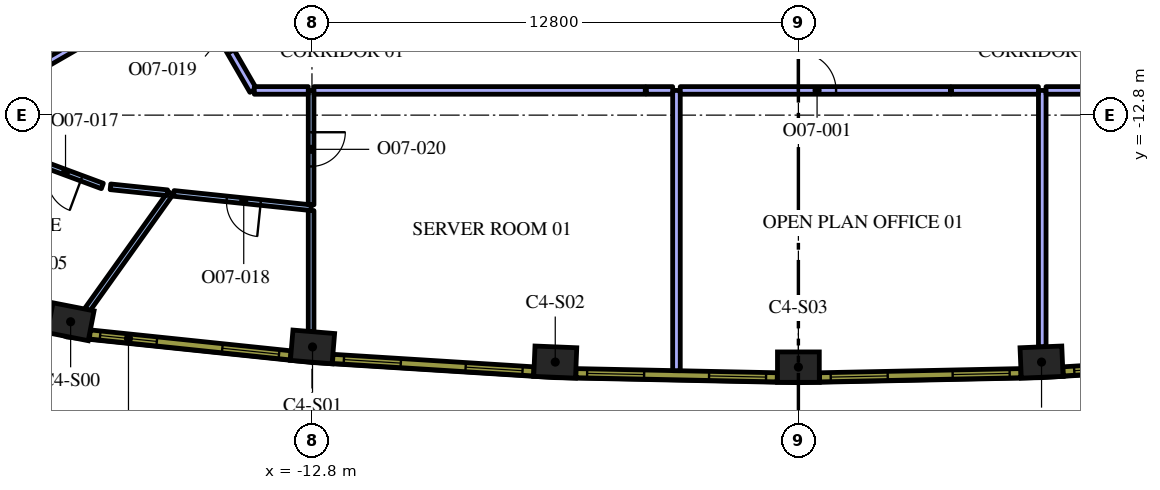
"""IFC4 building model, lengths in metres.
Left out: names, types, materials, properties, quantities, classifications, styles, units other than length and angle.
Written with IfcOpenShell. Run it as: python <this file> out.ifc"""

import sys

from ifc_helpers import new_model, si_unit, direction, frame, frame_2d, origin, origin_2d, place, context, subcontext, project, spatial, rectangle, extrude, element, fill, save


model = new_model("IFC4")
c1 = context("Model", 3, precision=1e-05, world=origin(), true_north=direction((0.0, 1.0)))
c2 = subcontext(c1, "Body", "Model", "MODEL_VIEW")
j1 = project(units=[si_unit("LENGTHUNIT", "METRE"), si_unit("PLANEANGLEUNIT", "RADIAN")], contexts=[c1])
p1 = place(None, origin())
s1 = spatial("IfcSite", under=j1, at=p1, CompositionType="ELEMENT")
p2 = place(p1, origin())
s2 = spatial("IfcBuilding", under=s1, at=p2, CompositionType="ELEMENT")
p3 = place(p2, frame((0.0, 0.0, 218.4)))
s3 = spatial("IfcBuildingStorey", under=s2, at=p3, CompositionType="ELEMENT", Elevation=218.4)
for number, where, z_axis, x_axis in (
    (1, (-19.15, -18.237, 0.0), (0.0, 0.0, 1.0), (0.981, -0.192, 0.0)),
    (2, (-12.785, -18.9, 0.0), (0.0, 0.0, 1.0), (0.997, -0.083, 0.0)),
    (3, (-6.398, -19.298, 0.0), (0.0, 0.0, 1.0), (0.999, -0.041, 0.0)),
    (4, (0.0, -19.431, 0.0), (0.0, 0.0, 1.0), (1.0, 0.0, 0.0)),
    (5, (6.398, -19.298, 0.0), (0.0, 0.0, 1.0), (0.999, 0.041, 0.0)),
):
    element("IfcColumn", number, at=place(p3, frame(where, z_axis=z_axis, x_axis=x_axis)), inside=s3, PredefinedType="COLUMN", context=c2, shape_type="SweptSolid", body=[
        extrude(rectangle(XDim=1.1, YDim=0.8, at=origin_2d()), origin(), (0.0, 0.0, 1.0), 4.2),
    ])
p4 = place(p3, frame((6.417, -12.15, 0.0), z_axis=(0.0, 0.0, 1.0), x_axis=(0.0, -1.0, 0.0)))
e6 = element("IfcWall", 6, at=p4, inside=s3, PredefinedType="PARTITIONING", context=c2, shape_type="SweptSolid", body=[
    extrude(rectangle(XDim=6.747, YDim=0.2, at=frame_2d((3.374, 0.0))), origin(), (0.0, 0.0, 1.0), 3.45),
])
p5 = place(p3, frame((-3.208, -19.524, 0.0), z_axis=(0.0, 0.0, 1.0), x_axis=(0.0, 1.0, 0.0)))
e7 = element("IfcWall", 7, at=p5, inside=s3, PredefinedType="PARTITIONING", context=c2, shape_type="SweptSolid", body=[
    extrude(rectangle(XDim=7.374, YDim=0.2, at=frame_2d((3.687, 0.0))), origin(), (0.0, 0.0, 1.0), 3.45),
])
p6 = place(p3, frame((-3.108, -12.15, 0.0), z_axis=(0.0, 0.0, 1.0), x_axis=(1.0, 0.0, 0.0)))
e8 = element("IfcWall", 8, at=p6, inside=s3, PredefinedType="PARTITIONING", context=c2, shape_type="SweptSolid", body=[
    extrude(rectangle(XDim=7.108, YDim=0.2, at=frame_2d((3.554, 0.0))), origin(), (0.0, 0.0, 1.0), 3.45),
])
p7 = place(p6, frame((3.1, 0.0, 0.0)))
e9 = element("IfcOpeningElement", 9, at=p7, cuts=e8, PredefinedType="OPENING", context=c2, shape_type="SweptSolid", body=[
    extrude(rectangle(XDim=1.0, YDim=2.1, at=frame_2d((0.5, 1.05))), frame((0.0, 0.11, 0.0), z_axis=(0.0, -1.0, 0.0), x_axis=(1.0, 0.0, 0.0)), (0.0, 0.0, 1.0), 0.22),
])
p8 = place(p3, frame((4.03, -12.15, 0.0), z_axis=(0.0, 0.0, 1.0), x_axis=(1.0, 0.0, 0.0)))
e10 = element("IfcWall", 10, at=p8, inside=s3, PredefinedType="PARTITIONING", context=c2, shape_type="SweptSolid", body=[
    extrude(rectangle(XDim=2.287, YDim=0.2, at=frame_2d((1.144, 0.0))), origin(), (0.0, 0.0, 1.0), 3.45),
])
p9 = place(p3, frame((6.517, -12.15, 0.0), z_axis=(0.0, 0.0, 1.0), x_axis=(1.0, 0.0, 0.0)))
e11 = element("IfcWall", 11, at=p9, inside=s3, PredefinedType="PARTITIONING", context=c2, shape_type="SweptSolid", body=[
    extrude(rectangle(XDim=7.83, YDim=0.2, at=frame_2d((3.915, 0.0))), origin(), (0.0, 0.0, 1.0), 3.45),
])
p10 = place(p9, frame((3.4, 0.0, 0.0)))
e12 = element("IfcOpeningElement", 12, at=p10, cuts=e11, PredefinedType="OPENING", context=c2, shape_type="SweptSolid", body=[
    extrude(rectangle(XDim=1.0, YDim=2.1, at=frame_2d((0.5, 1.05))), frame((0.0, 0.11, 0.0), z_axis=(0.0, -1.0, 0.0), x_axis=(1.0, 0.0, 0.0)), (0.0, 0.0, 1.0), 0.22),
])
p11 = place(p3, frame((-16.021, -9.25, 0.0), z_axis=(0.0, 0.0, 1.0), x_axis=(-0.866021955858, -0.500005971936, 0.0)))
e13 = element("IfcWall", 13, at=p11, inside=s3, PredefinedType="PARTITIONING", context=c2, shape_type="SweptSolid", body=[
    extrude(rectangle(XDim=6.56, YDim=0.2, at=frame_2d((3.28, 0.0))), origin(), (0.0, 0.0, 1.0), 3.45),
])
p12 = place(p3, frame((-16.521, -14.851, 0.0), z_axis=(0.0, 0.0, 1.0), x_axis=(-0.58104805465, -0.813869251285, 0.0)))
e14 = element("IfcWall", 14, at=p12, inside=s3, PredefinedType="PARTITIONING", context=c2, shape_type="SweptSolid", body=[
    extrude(rectangle(XDim=3.766, YDim=0.15, at=frame_2d((1.883, 0.0))), origin(), (0.0, 0.0, 1.0), 3.45),
])
p13 = place(p3, frame((-18.316, -14.664, 0.0), z_axis=(0.0, 0.0, 1.0), x_axis=(-0.937594570401, 0.347730386297, 0.0)))
e15 = element("IfcWall", 15, at=p13, inside=s3, PredefinedType="PARTITIONING", context=c2, shape_type="SweptSolid", body=[
    extrude(rectangle(XDim=2.083, YDim=0.15, at=frame_2d((1.042, 0.0))), origin(), (0.0, 0.0, 1.0), 3.45),
])
p14 = place(p13, frame((0.583, 0.0, 0.0)))
e16 = element("IfcOpeningElement", 16, at=p14, cuts=e15, PredefinedType="OPENING", context=c2, shape_type="SweptSolid", body=[
    extrude(rectangle(XDim=0.9, YDim=2.1, at=frame_2d((0.45, 1.05))), frame((0.0, 0.085, 0.0), z_axis=(0.0, -1.0, 0.0), x_axis=(1.0, 0.0, 0.0)), (0.0, 0.0, 1.0), 0.17),
])
p15 = place(p3, frame((-18.103, -14.686, 0.0), z_axis=(0.0, 0.0, 1.0), x_axis=(0.994622241781, -0.103569281909, 0.0)))
e17 = element("IfcWall", 17, at=p15, inside=s3, PredefinedType="PARTITIONING", context=c2, shape_type="SweptSolid", body=[
    extrude(rectangle(XDim=1.504, YDim=0.15, at=frame_2d((0.752, 0.0))), origin(), (0.0, 0.0, 1.0), 3.45),
])
p16 = place(p3, frame((-12.823, -15.236, 0.0), z_axis=(0.0, 0.0, 1.0), x_axis=(-0.994621582944, 0.10357560882, 0.0)))
e18 = element("IfcWall", 18, at=p16, inside=s3, PredefinedType="PARTITIONING", context=c2, shape_type="SweptSolid", body=[
    extrude(rectangle(XDim=3.632, YDim=0.15, at=frame_2d((1.816, 0.0))), origin(), (0.0, 0.0, 1.0), 3.45),
])
p17 = place(p16, frame((1.332, 0.0, 0.0)))
e19 = element("IfcOpeningElement", 19, at=p17, cuts=e18, PredefinedType="OPENING", context=c2, shape_type="SweptSolid", body=[
    extrude(rectangle(XDim=0.9, YDim=2.1, at=frame_2d((0.45, 1.05))), frame((0.0, 0.085, 0.0), z_axis=(0.0, -1.0, 0.0), x_axis=(1.0, 0.0, 0.0)), (0.0, 0.0, 1.0), 0.17),
])
p18 = place(p3, frame((-12.823, -15.312, 0.0), z_axis=(0.0, 0.0, 1.0), x_axis=(0.0, -1.0, 0.0)))
e20 = element("IfcWall", 20, at=p18, inside=s3, PredefinedType="PARTITIONING", context=c2, shape_type="SweptSolid", body=[
    extrude(rectangle(XDim=3.184, YDim=0.15, at=frame_2d((1.592, 0.0))), origin(), (0.0, 0.0, 1.0), 3.45),
])
p19 = place(p3, frame((-12.823, -12.15, 0.0), z_axis=(0.0, 0.0, 1.0), x_axis=(0.0, -1.0, 0.0)))
e21 = element("IfcWall", 21, at=p19, inside=s3, PredefinedType="PARTITIONING", context=c2, shape_type="SweptSolid", body=[
    extrude(rectangle(XDim=3.011, YDim=0.15, at=frame_2d((1.505, 0.0))), origin(), (0.0, 0.0, 1.0), 3.45),
])
p20 = place(p19, frame((1.1, 0.0, 0.0)))
e22 = element("IfcOpeningElement", 22, at=p20, cuts=e21, PredefinedType="OPENING", context=c2, shape_type="SweptSolid", body=[
    extrude(rectangle(XDim=0.9, YDim=2.1, at=frame_2d((0.45, 1.05))), frame((0.0, 0.085, 0.0), z_axis=(0.0, -1.0, 0.0), x_axis=(1.0, 0.0, 0.0)), (0.0, 0.0, 1.0), 0.17),
])
p21 = place(p3, frame((-15.971, -9.337, 0.0), z_axis=(0.0, 0.0, 1.0), x_axis=(0.500010870188, -0.866019127788, 0.0)))
e23 = element("IfcWall", 23, at=p21, inside=s3, PredefinedType="PARTITIONING", context=c2, shape_type="SweptSolid", body=[
    extrude(rectangle(XDim=3.249, YDim=0.2, at=frame_2d((1.624, 0.0))), origin(), (0.0, 0.0, 1.0), 3.45),
])
p22 = place(p21, frame((1.1, 0.0, 0.0)))
e24 = element("IfcOpeningElement", 24, at=p22, cuts=e23, PredefinedType="OPENING", context=c2, shape_type="SweptSolid", body=[
    extrude(rectangle(XDim=1.0, YDim=2.1, at=frame_2d((0.5, 1.05))), frame((0.0, 0.11, 0.0), z_axis=(0.0, -1.0, 0.0), x_axis=(1.0, 0.0, 0.0)), (0.0, 0.0, 1.0), 0.22),
])
p23 = place(p3, frame((-14.317, -12.15, 0.0), z_axis=(0.0, 0.0, 1.0), x_axis=(1.0, 0.0, 0.0)))
e25 = element("IfcWall", 25, at=p23, inside=s3, PredefinedType="PARTITIONING", context=c2, shape_type="SweptSolid", body=[
    extrude(rectangle(XDim=1.419, YDim=0.2, at=frame_2d((0.71, 0.0))), origin(), (0.0, 0.0, 1.0), 3.45),
])
p24 = place(p3, frame((-4.0, -12.15, 0.0), z_axis=(0.0, 0.0, 1.0), x_axis=(1.0, 0.0, 0.0)))
e26 = element("IfcWall", 26, at=p24, inside=s3, PredefinedType="PARTITIONING", context=c2, shape_type="SweptSolid", body=[
    extrude(rectangle(XDim=0.692, YDim=0.2, at=frame_2d((0.346, 0.0))), origin(), (0.0, 0.0, 1.0), 3.45),
])
p25 = place(p3, frame((-12.748, -12.15, 0.0), z_axis=(0.0, 0.0, 1.0), x_axis=(1.0, 0.0, 0.0)))
e27 = element("IfcWall", 27, at=p25, inside=s3, PredefinedType="PARTITIONING", context=c2, shape_type="SweptSolid", body=[
    extrude(rectangle(XDim=8.718, YDim=0.2, at=frame_2d((4.359, 0.0))), origin(), (0.0, 0.0, 1.0), 3.45),
])
p26 = place(p3, frame((-18.644, -18.571, 0.0), z_axis=(0.0, 0.0, 1.0), x_axis=(0.994621961215, -0.103571976272, 0.0)))
e28 = element("IfcWall", 28, at=p26, inside=s3, PredefinedType="SOLIDWALL", context=c2, shape_type="SweptSolid", body=[
    extrude(rectangle(XDim=5.311, YDim=0.24, at=frame_2d((2.655, 0.0))), origin(), (0.0, 0.0, 1.0), 3.95),
])
p27 = place(p26, frame((0.271, 0.0, 0.9)))
e29 = element("IfcOpeningElement", 29, at=p27, cuts=e28, PredefinedType="OPENING", context=c2, shape_type="SweptSolid", body=[
    extrude(rectangle(XDim=1.5, YDim=2.55, at=frame_2d((0.75, 1.275))), frame((0.0, 0.13, 0.0), z_axis=(0.0, -1.0, 0.0), x_axis=(1.0, 0.0, 0.0)), (0.0, 0.0, 1.0), 0.26),
])
p28 = place(p26, frame((3.504, 0.0, 0.9)))
e30 = element("IfcOpeningElement", 30, at=p28, cuts=e28, PredefinedType="OPENING", context=c2, shape_type="SweptSolid", body=[
    extrude(rectangle(XDim=1.5, YDim=2.55, at=frame_2d((0.75, 1.275))), frame((0.0, 0.13, 0.0), z_axis=(0.0, -1.0, 0.0), x_axis=(1.0, 0.0, 0.0)), (0.0, 0.0, 1.0), 0.26),
])
p29 = place(p3, frame((-12.253, -19.213, 0.0), z_axis=(0.0, 0.0, 1.0), x_axis=(0.9980633213, -0.062206162685, 0.0)))
e31 = element("IfcWall", 31, at=p29, inside=s3, PredefinedType="SOLIDWALL", context=c2, shape_type="SweptSolid", body=[
    extrude(rectangle(XDim=5.298, YDim=0.24, at=frame_2d((2.649, 0.0))), origin(), (0.0, 0.0, 1.0), 3.95),
])
p30 = place(p29, frame((0.294, 0.0, 0.9)))
e32 = element("IfcOpeningElement", 32, at=p30, cuts=e31, PredefinedType="OPENING", context=c2, shape_type="SweptSolid", body=[
    extrude(rectangle(XDim=1.5, YDim=2.55, at=frame_2d((0.75, 1.275))), frame((0.0, 0.13, 0.0), z_axis=(0.0, -1.0, 0.0), x_axis=(1.0, 0.0, 0.0)), (0.0, 0.0, 1.0), 0.26),
])
p31 = place(p29, frame((3.504, 0.0, 0.9)))
e33 = element("IfcOpeningElement", 33, at=p31, cuts=e31, PredefinedType="OPENING", context=c2, shape_type="SweptSolid", body=[
    extrude(rectangle(XDim=1.5, YDim=2.55, at=frame_2d((0.75, 1.275))), frame((0.0, 0.13, 0.0), z_axis=(0.0, -1.0, 0.0), x_axis=(1.0, 0.0, 0.0)), (0.0, 0.0, 1.0), 0.26),
])
p32 = place(p3, frame((-5.854, -19.589, 0.0), z_axis=(0.0, 0.0, 1.0), x_axis=(0.999784035184, -0.020781794712, 0.0)))
e34 = element("IfcWall", 34, at=p32, inside=s3, PredefinedType="SOLIDWALL", context=c2, shape_type="SweptSolid", body=[
    extrude(rectangle(XDim=5.298, YDim=0.24, at=frame_2d((2.649, 0.0))), origin(), (0.0, 0.0, 1.0), 3.95),
])
p33 = place(p32, frame((0.294, 0.0, 0.9)))
e35 = element("IfcOpeningElement", 35, at=p33, cuts=e34, PredefinedType="OPENING", context=c2, shape_type="SweptSolid", body=[
    extrude(rectangle(XDim=1.5, YDim=2.55, at=frame_2d((0.75, 1.275))), frame((0.0, 0.13, 0.0), z_axis=(0.0, -1.0, 0.0), x_axis=(1.0, 0.0, 0.0)), (0.0, 0.0, 1.0), 0.26),
])
p34 = place(p32, frame((3.504, 0.0, 0.9)))
e36 = element("IfcOpeningElement", 36, at=p34, cuts=e34, PredefinedType="OPENING", context=c2, shape_type="SweptSolid", body=[
    extrude(rectangle(XDim=1.5, YDim=2.55, at=frame_2d((0.75, 1.275))), frame((0.0, 0.13, 0.0), z_axis=(0.0, -1.0, 0.0), x_axis=(1.0, 0.0, 0.0)), (0.0, 0.0, 1.0), 0.26),
])
p35 = place(p3, frame((0.556, -19.699, 0.0), z_axis=(0.0, 0.0, 1.0), x_axis=(0.999784035184, 0.020781794712, 0.0)))
e37 = element("IfcWall", 37, at=p35, inside=s3, PredefinedType="SOLIDWALL", context=c2, shape_type="SweptSolid", body=[
    extrude(rectangle(XDim=5.298, YDim=0.24, at=frame_2d((2.649, 0.0))), origin(), (0.0, 0.0, 1.0), 3.95),
])
p36 = place(p35, frame((0.294, 0.0, 0.9)))
e38 = element("IfcOpeningElement", 38, at=p36, cuts=e37, PredefinedType="OPENING", context=c2, shape_type="SweptSolid", body=[
    extrude(rectangle(XDim=1.5, YDim=2.55, at=frame_2d((0.75, 1.275))), frame((0.0, 0.13, 0.0), z_axis=(0.0, -1.0, 0.0), x_axis=(1.0, 0.0, 0.0)), (0.0, 0.0, 1.0), 0.26),
])
p37 = place(p35, frame((3.504, 0.0, 0.9)))
e39 = element("IfcOpeningElement", 39, at=p37, cuts=e37, PredefinedType="OPENING", context=c2, shape_type="SweptSolid", body=[
    extrude(rectangle(XDim=1.5, YDim=2.55, at=frame_2d((0.75, 1.275))), frame((0.0, 0.13, 0.0), z_axis=(0.0, -1.0, 0.0), x_axis=(1.0, 0.0, 0.0)), (0.0, 0.0, 1.0), 0.26),
])
p38 = place(p3, frame((6.965, -19.543, 0.0), z_axis=(0.0, 0.0, 1.0), x_axis=(0.9980633213, 0.062206162685, 0.0)))
e40 = element("IfcWall", 40, at=p38, inside=s3, PredefinedType="SOLIDWALL", context=c2, shape_type="SweptSolid", body=[
    extrude(rectangle(XDim=5.298, YDim=0.24, at=frame_2d((2.649, 0.0))), origin(), (0.0, 0.0, 1.0), 3.95),
])
p39 = place(p38, frame((0.295, 0.0, 0.9)))
e41 = element("IfcOpeningElement", 41, at=p39, cuts=e40, PredefinedType="OPENING", context=c2, shape_type="SweptSolid", body=[
    extrude(rectangle(XDim=1.5, YDim=2.55, at=frame_2d((0.75, 1.275))), frame((0.0, 0.13, 0.0), z_axis=(0.0, -1.0, 0.0), x_axis=(1.0, 0.0, 0.0)), (0.0, 0.0, 1.0), 0.26),
])
p40 = place(p38, frame((3.504, 0.0, 0.9)))
e42 = element("IfcOpeningElement", 42, at=p40, cuts=e40, PredefinedType="OPENING", context=c2, shape_type="SweptSolid", body=[
    extrude(rectangle(XDim=1.5, YDim=2.55, at=frame_2d((0.75, 1.275))), frame((0.0, 0.13, 0.0), z_axis=(0.0, -1.0, 0.0), x_axis=(1.0, 0.0, 0.0)), (0.0, 0.0, 1.0), 0.26),
])
p41 = place(p7, origin())
e43 = element("IfcDoor", 43, at=p41, inside=s3, OperationType="SINGLE_SWING_RIGHT", PredefinedType="DOOR", context=c2, shape_type="SweptSolid", body=[
    extrude(rectangle(XDim=1.0, YDim=2.1, at=frame_2d((0.5, 1.05))), frame((0.0, 0.025, 0.0), z_axis=(0.0, -1.0, 0.0), x_axis=(1.0, 0.0, 0.0)), (0.0, 0.0, 1.0), 0.05),
])
fill(e9, e43)
p42 = place(p14, origin())
e44 = element("IfcDoor", 44, at=p42, inside=s3, OperationType="SINGLE_SWING_LEFT", PredefinedType="DOOR", context=c2, shape_type="SweptSolid", body=[
    extrude(rectangle(XDim=0.9, YDim=2.1, at=frame_2d((0.45, 1.05))), frame((0.0, 0.025, 0.0), z_axis=(0.0, -1.0, 0.0), x_axis=(1.0, 0.0, 0.0)), (0.0, 0.0, 1.0), 0.05),
])
fill(e16, e44)
p43 = place(p17, origin())
e45 = element("IfcDoor", 45, at=p43, inside=s3, OperationType="SINGLE_SWING_LEFT", PredefinedType="DOOR", context=c2, shape_type="SweptSolid", body=[
    extrude(rectangle(XDim=0.9, YDim=2.1, at=frame_2d((0.45, 1.05))), frame((0.0, 0.025, 0.0), z_axis=(0.0, -1.0, 0.0), x_axis=(1.0, 0.0, 0.0)), (0.0, 0.0, 1.0), 0.05),
])
fill(e19, e45)
p44 = place(p22, origin())
e46 = element("IfcDoor", 46, at=p44, inside=s3, OperationType="SINGLE_SWING_LEFT", PredefinedType="DOOR", context=c2, shape_type="SweptSolid", body=[
    extrude(rectangle(XDim=1.0, YDim=2.1, at=frame_2d((0.5, 1.05))), frame((0.0, 0.025, 0.0), z_axis=(0.0, -1.0, 0.0), x_axis=(1.0, 0.0, 0.0)), (0.0, 0.0, 1.0), 0.05),
])
fill(e24, e46)
p45 = place(p20, origin())
e47 = element("IfcDoor", 47, at=p45, inside=s3, OperationType="SINGLE_SWING_RIGHT", PredefinedType="DOOR", context=c2, shape_type="SweptSolid", body=[
    extrude(rectangle(XDim=0.9, YDim=2.1, at=frame_2d((0.45, 1.05))), frame((0.0, 0.025, 0.0), z_axis=(0.0, -1.0, 0.0), x_axis=(1.0, 0.0, 0.0)), (0.0, 0.0, 1.0), 0.05),
])
fill(e22, e47)
p46 = place(p27, origin())
e48 = element("IfcWindow", 48, at=p46, inside=s3, PartitioningType="SINGLE_PANEL", PredefinedType="WINDOW", context=c2, shape_type="SweptSolid", body=[
    extrude(rectangle(XDim=1.5, YDim=2.55, at=frame_2d((0.75, 1.275))), frame((0.0, 0.04, 0.0), z_axis=(0.0, -1.0, 0.0), x_axis=(1.0, 0.0, 0.0)), (0.0, 0.0, 1.0), 0.06),
])
fill(e29, e48)
p47 = place(p28, origin())
e49 = element("IfcWindow", 49, at=p47, inside=s3, PartitioningType="SINGLE_PANEL", PredefinedType="WINDOW", context=c2, shape_type="SweptSolid", body=[
    extrude(rectangle(XDim=1.5, YDim=2.55, at=frame_2d((0.75, 1.275))), frame((0.0, 0.04, 0.0), z_axis=(0.0, -1.0, 0.0), x_axis=(1.0, 0.0, 0.0)), (0.0, 0.0, 1.0), 0.06),
])
fill(e30, e49)
p48 = place(p30, origin())
e50 = element("IfcWindow", 50, at=p48, inside=s3, PartitioningType="SINGLE_PANEL", PredefinedType="WINDOW", context=c2, shape_type="SweptSolid", body=[
    extrude(rectangle(XDim=1.5, YDim=2.55, at=frame_2d((0.75, 1.275))), frame((0.0, 0.04, 0.0), z_axis=(0.0, -1.0, 0.0), x_axis=(1.0, 0.0, 0.0)), (0.0, 0.0, 1.0), 0.06),
])
fill(e32, e50)
p49 = place(p31, origin())
e51 = element("IfcWindow", 51, at=p49, inside=s3, PartitioningType="SINGLE_PANEL", PredefinedType="WINDOW", context=c2, shape_type="SweptSolid", body=[
    extrude(rectangle(XDim=1.5, YDim=2.55, at=frame_2d((0.75, 1.275))), frame((0.0, 0.04, 0.0), z_axis=(0.0, -1.0, 0.0), x_axis=(1.0, 0.0, 0.0)), (0.0, 0.0, 1.0), 0.06),
])
fill(e33, e51)
p50 = place(p33, origin())
e52 = element("IfcWindow", 52, at=p50, inside=s3, PartitioningType="SINGLE_PANEL", PredefinedType="WINDOW", context=c2, shape_type="SweptSolid", body=[
    extrude(rectangle(XDim=1.5, YDim=2.55, at=frame_2d((0.75, 1.275))), frame((0.0, 0.04, 0.0), z_axis=(0.0, -1.0, 0.0), x_axis=(1.0, 0.0, 0.0)), (0.0, 0.0, 1.0), 0.06),
])
fill(e35, e52)
p51 = place(p34, origin())
e53 = element("IfcWindow", 53, at=p51, inside=s3, PartitioningType="SINGLE_PANEL", PredefinedType="WINDOW", context=c2, shape_type="SweptSolid", body=[
    extrude(rectangle(XDim=1.5, YDim=2.55, at=frame_2d((0.75, 1.275))), frame((0.0, 0.04, 0.0), z_axis=(0.0, -1.0, 0.0), x_axis=(1.0, 0.0, 0.0)), (0.0, 0.0, 1.0), 0.06),
])
fill(e36, e53)
p52 = place(p36, origin())
e54 = element("IfcWindow", 54, at=p52, inside=s3, PartitioningType="SINGLE_PANEL", PredefinedType="WINDOW", context=c2, shape_type="SweptSolid", body=[
    extrude(rectangle(XDim=1.5, YDim=2.55, at=frame_2d((0.75, 1.275))), frame((0.0, 0.04, 0.0), z_axis=(0.0, -1.0, 0.0), x_axis=(1.0, 0.0, 0.0)), (0.0, 0.0, 1.0), 0.06),
])
fill(e38, e54)
p53 = place(p37, origin())
e55 = element("IfcWindow", 55, at=p53, inside=s3, PartitioningType="SINGLE_PANEL", PredefinedType="WINDOW", context=c2, shape_type="SweptSolid", body=[
    extrude(rectangle(XDim=1.5, YDim=2.55, at=frame_2d((0.75, 1.275))), frame((0.0, 0.04, 0.0), z_axis=(0.0, -1.0, 0.0), x_axis=(1.0, 0.0, 0.0)), (0.0, 0.0, 1.0), 0.06),
])
fill(e39, e55)
p54 = place(p39, origin())
e56 = element("IfcWindow", 56, at=p54, inside=s3, PartitioningType="SINGLE_PANEL", PredefinedType="WINDOW", context=c2, shape_type="SweptSolid", body=[
    extrude(rectangle(XDim=1.5, YDim=2.55, at=frame_2d((0.75, 1.275))), frame((0.0, 0.04, 0.0), z_axis=(0.0, -1.0, 0.0), x_axis=(1.0, 0.0, 0.0)), (0.0, 0.0, 1.0), 0.06),
])
fill(e41, e56)
save(model, sys.argv[1])
